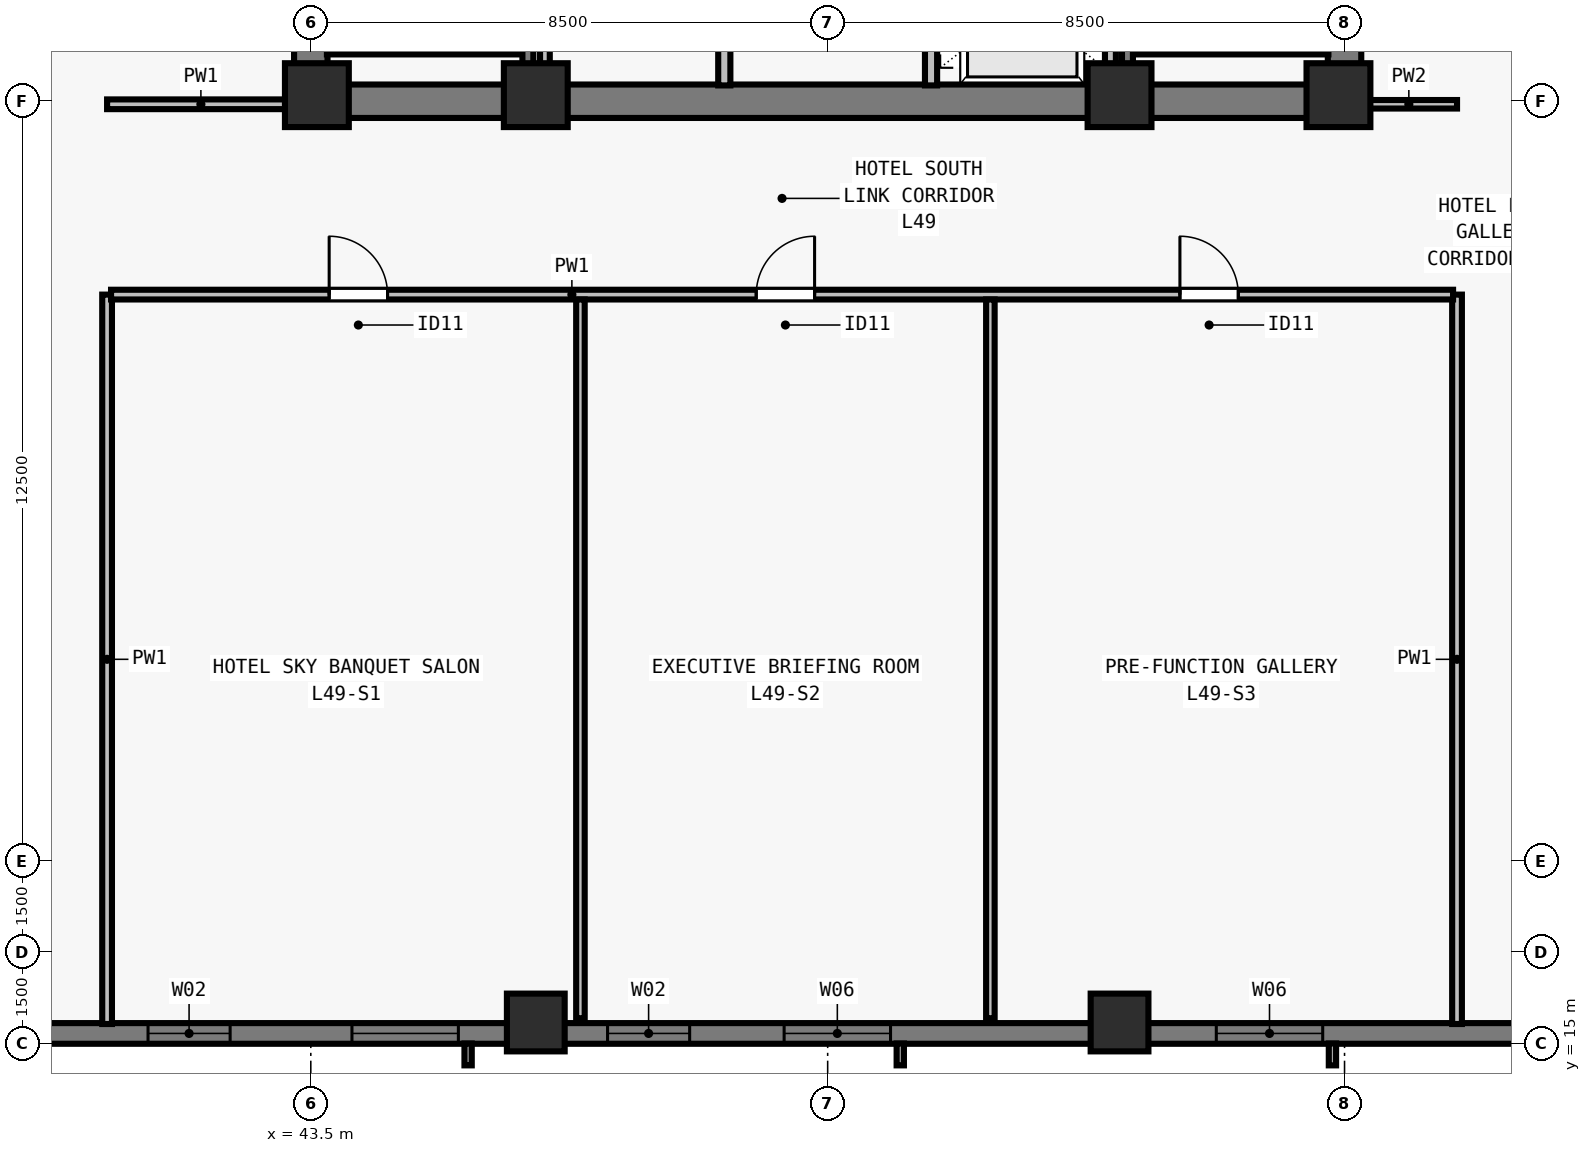
"""IFC4 building model, lengths in metres.
Left out: names, types, materials, properties, quantities, classifications, styles, units other than length and angle.
Written with IfcOpenShell. Run it as: python <this file> out.ifc"""

import sys

from ifc_helpers import new_model, si_unit, direction, frame, frame_2d, origin, origin_2d, place, context, subcontext, project, spatial, rectangle, extrude, element, fill, save


model = new_model("IFC4")
c1 = context("Model", 3, precision=1e-05, world=origin(), true_north=direction((0.0, 1.0)))
c2 = subcontext(c1, "Body", "Model", "MODEL_VIEW")
j1 = project(units=[si_unit("LENGTHUNIT", "METRE"), si_unit("PLANEANGLEUNIT", "RADIAN")], contexts=[c1])
p1 = place(None, origin())
s1 = spatial("IfcSite", under=j1, at=p1, CompositionType="ELEMENT")
p2 = place(p1, origin())
s2 = spatial("IfcBuilding", under=s1, at=p2, CompositionType="ELEMENT")
p3 = place(p2, frame((0.0, 0.0, 179.5)))
s3 = spatial("IfcBuildingStorey", under=s2, at=p3, CompositionType="ELEMENT", Elevation=179.5)
for number, where, z_axis, x_axis in (
    (1, (43.6, 30.6, 0.0), (0.0, 0.0, 1.0), (1.0, 0.0, 0.0)),
    (2, (47.2, 30.6, 0.0), (0.0, 0.0, 1.0), (1.0, 0.0, 0.0)),
    (3, (56.8, 30.6, 0.0), (0.0, 0.0, 1.0), (1.0, 0.0, 0.0)),
    (4, (60.4, 30.6, 0.0), (0.0, 0.0, 1.0), (1.0, 0.0, 0.0)),
):
    element("IfcColumn", number, at=place(p3, frame(where, z_axis=z_axis, x_axis=x_axis)), inside=s3, PredefinedType="COLUMN", context=c2, shape_type="SweptSolid", body=[
        extrude(rectangle(XDim=1.05, YDim=1.05, at=origin_2d()), origin(), (0.0, 0.0, 1.0), 3.5),
    ])
for number, where, z_axis, x_axis in (
    (5, (47.2, 15.35, 0.0), (0.0, 0.0, 1.0), (1.0, 0.0, 0.0)),
    (6, (56.8, 15.35, 0.0), (0.0, 0.0, 1.0), (1.0, 0.0, 0.0)),
):
    element("IfcColumn", number, at=place(p3, frame(where, z_axis=z_axis, x_axis=x_axis)), inside=s3, PredefinedType="COLUMN", context=c2, shape_type="SweptSolid", body=[
        extrude(rectangle(XDim=0.95, YDim=0.95, at=origin_2d()), origin(), (0.0, 0.0, 1.0), 3.5),
    ])
p4 = place(p3, frame((72.0, 15.17, 0.0), z_axis=(0.0, 0.0, 1.0), x_axis=(-1.0, 0.0, 0.0)))
e7 = element("IfcWall", 7, at=p4, inside=s3, PredefinedType="SOLIDWALL", context=c2, shape_type="SweptSolid", body=[
    extrude(rectangle(XDim=39.682, YDim=0.34, at=frame_2d((19.841, 0.0))), origin(), (0.0, 0.0, 1.0), 3.28),
])
p5 = place(p4, frame((11.859, 0.0, 0.8)))
e8 = element("IfcOpeningElement", 8, at=p5, cuts=e7, PredefinedType="OPENING", context=c2, shape_type="SweptSolid", body=[
    extrude(rectangle(XDim=1.75, YDim=1.66, at=frame_2d((0.875, 0.83))), frame((0.0, 0.18, 0.0), z_axis=(0.0, -1.0, 0.0), x_axis=(1.0, 0.0, 0.0)), (0.0, 0.0, 1.0), 0.36),
])
p6 = place(p4, frame((18.966, 0.0, 0.8)))
e9 = element("IfcOpeningElement", 9, at=p6, cuts=e7, PredefinedType="OPENING", context=c2, shape_type="SweptSolid", body=[
    extrude(rectangle(XDim=1.75, YDim=1.66, at=frame_2d((0.875, 0.83))), frame((0.0, 0.18, 0.0), z_axis=(0.0, -1.0, 0.0), x_axis=(1.0, 0.0, 0.0)), (0.0, 0.0, 1.0), 0.36),
])
p7 = place(p4, frame((22.27, 0.0, 0.8)))
e10 = element("IfcOpeningElement", 10, at=p7, cuts=e7, PredefinedType="OPENING", context=c2, shape_type="SweptSolid", body=[
    extrude(rectangle(XDim=1.35, YDim=1.66, at=frame_2d((0.675, 0.83))), frame((0.0, 0.18, 0.0), z_axis=(0.0, -1.0, 0.0), x_axis=(1.0, 0.0, 0.0)), (0.0, 0.0, 1.0), 0.36),
])
p8 = place(p4, frame((26.073, 0.0, 0.8)))
e11 = element("IfcOpeningElement", 11, at=p8, cuts=e7, PredefinedType="OPENING", context=c2, shape_type="SweptSolid", body=[
    extrude(rectangle(XDim=1.75, YDim=1.66, at=frame_2d((0.875, 0.83))), frame((0.0, 0.18, 0.0), z_axis=(0.0, -1.0, 0.0), x_axis=(1.0, 0.0, 0.0)), (0.0, 0.0, 1.0), 0.36),
])
p9 = place(p4, frame((29.827, 0.0, 0.8)))
e12 = element("IfcOpeningElement", 12, at=p9, cuts=e7, PredefinedType="OPENING", context=c2, shape_type="SweptSolid", body=[
    extrude(rectangle(XDim=1.35, YDim=1.66, at=frame_2d((0.675, 0.83))), frame((0.0, 0.18, 0.0), z_axis=(0.0, -1.0, 0.0), x_axis=(1.0, 0.0, 0.0)), (0.0, 0.0, 1.0), 0.36),
])
p10 = place(p3, frame((43.225, 30.5, 0.0), z_axis=(0.0, 0.0, 1.0), x_axis=(1.0, 0.0, 0.0)))
e13 = element("IfcWall", 13, at=p10, inside=s3, PredefinedType="SHEAR", context=c2, shape_type="SweptSolid", body=[
    extrude(rectangle(XDim=17.55, YDim=0.55, at=frame_2d((8.775, 0.0))), origin(), (0.0, 0.0, 1.0), 3.28),
])
for number, where, z_axis, x_axis in (
    (14, (43.5, 30.765, 0.0), (0.0, 0.0, 1.0), (0.0, 1.0, 0.0)),
    (15, (60.5, 30.765, 0.0), (0.0, 0.0, 1.0), (0.0, 1.0, 0.0)),
):
    element("IfcWall", number, at=place(p3, frame(where, z_axis=z_axis, x_axis=x_axis)), inside=s3, PredefinedType="SHEAR", context=c2, shape_type="SweptSolid", body=[
        extrude(rectangle(XDim=7.985, YDim=0.55, at=frame_2d((3.993, 0.0))), origin(), (0.0, 0.0, 1.0), 3.28),
    ])
p11 = place(p3, frame((50.3, 30.76, 0.0), z_axis=(0.0, 0.0, 1.0), x_axis=(0.0, 1.0, 0.0)))
e16 = element("IfcWall", 16, at=p11, inside=s3, PredefinedType="SOLIDWALL", context=c2, shape_type="SweptSolid", body=[
    extrude(rectangle(XDim=7.855, YDim=0.2, at=frame_2d((3.927, 0.0))), origin(), (0.0, 0.0, 1.0), 3.28),
])
p12 = place(p11, frame((3.29, 0.0, 0.0)))
e17 = element("IfcOpeningElement", 17, at=p12, cuts=e16, PredefinedType="OPENING", context=c2, shape_type="SweptSolid", body=[
    extrude(rectangle(XDim=0.9, YDim=2.12, at=frame_2d((0.45, 1.06))), frame((0.0, 0.11, 0.0), z_axis=(0.0, -1.0, 0.0), x_axis=(1.0, 0.0, 0.0)), (0.0, 0.0, 1.0), 0.22),
])
p13 = place(p3, frame((53.7, 30.76, 0.0), z_axis=(0.0, 0.0, 1.0), x_axis=(0.0, 1.0, 0.0)))
e18 = element("IfcWall", 18, at=p13, inside=s3, PredefinedType="SOLIDWALL", context=c2, shape_type="SweptSolid", body=[
    extrude(rectangle(XDim=7.855, YDim=0.2, at=frame_2d((3.927, 0.0))), origin(), (0.0, 0.0, 1.0), 3.28),
])
p14 = place(p13, frame((0.79, 0.0, 0.0)))
e19 = element("IfcOpeningElement", 19, at=p14, cuts=e18, PredefinedType="OPENING", context=c2, shape_type="SweptSolid", body=[
    extrude(rectangle(XDim=1.1, YDim=2.2, at=frame_2d((0.55, 1.1))), frame((0.0, 0.11, 0.0), z_axis=(0.0, -1.0, 0.0), x_axis=(1.0, 0.0, 0.0)), (0.0, 0.0, 1.0), 0.22),
])
p15 = place(p13, frame((3.49, 0.0, 0.0)))
e20 = element("IfcOpeningElement", 20, at=p15, cuts=e18, PredefinedType="OPENING", context=c2, shape_type="SweptSolid", body=[
    extrude(rectangle(XDim=1.1, YDim=2.2, at=frame_2d((0.55, 1.1))), frame((0.0, 0.11, 0.0), z_axis=(0.0, -1.0, 0.0), x_axis=(1.0, 0.0, 0.0)), (0.0, 0.0, 1.0), 0.22),
])
p16 = place(p13, frame((6.19, 0.0, 0.0)))
e21 = element("IfcOpeningElement", 21, at=p16, cuts=e18, PredefinedType="OPENING", context=c2, shape_type="SweptSolid", body=[
    extrude(rectangle(XDim=1.1, YDim=2.2, at=frame_2d((0.55, 1.1))), frame((0.0, 0.11, 0.0), z_axis=(0.0, -1.0, 0.0), x_axis=(1.0, 0.0, 0.0)), (0.0, 0.0, 1.0), 0.22),
])
p17 = place(p3, frame((47.35, 30.76, 0.0), z_axis=(0.0, 0.0, 1.0), x_axis=(0.0, 1.0, 0.0)))
e22 = element("IfcWall", 22, at=p17, inside=s3, PredefinedType="PARTITIONING", context=c2, shape_type="SweptSolid", body=[
    extrude(rectangle(XDim=7.855, YDim=0.16, at=frame_2d((3.927, 0.0))), origin(), (0.0, 0.0, 1.0), 3.28),
])
p18 = place(p3, frame((56.65, 30.76, 0.0), z_axis=(0.0, 0.0, 1.0), x_axis=(0.0, 1.0, 0.0)))
e23 = element("IfcWall", 23, at=p18, inside=s3, PredefinedType="SOLIDWALL", context=c2, shape_type="SweptSolid", body=[
    extrude(rectangle(XDim=7.855, YDim=0.18, at=frame_2d((3.927, 0.0))), origin(), (0.0, 0.0, 1.0), 3.28),
])
p19 = place(p3, frame((40.15, 15.325, 0.0), z_axis=(0.0, 0.0, 1.0), x_axis=(0.0, 1.0, 0.0)))
e24 = element("IfcWall", 24, at=p19, inside=s3, PredefinedType="PARTITIONING", context=c2, shape_type="SweptSolid", body=[
    extrude(rectangle(XDim=11.995, YDim=0.16, at=frame_2d((5.998, 0.0))), origin(), (0.0, 0.0, 1.0), 2.555),
])
p20 = place(p3, frame((40.15, 30.45, 0.0), z_axis=(0.0, 0.0, 1.0), x_axis=(1.0, 0.0, 0.0)))
e25 = element("IfcWall", 25, at=p20, inside=s3, PredefinedType="PARTITIONING", context=c2, shape_type="SweptSolid", body=[
    extrude(rectangle(XDim=3.085, YDim=0.16, at=frame_2d((1.542, 0.0))), origin(), (0.0, 0.0, 1.0), 3.28),
])
p21 = place(p3, frame((62.35, 15.325, 0.0), z_axis=(0.0, 0.0, 1.0), x_axis=(0.0, 1.0, 0.0)))
e26 = element("IfcWall", 26, at=p21, inside=s3, PredefinedType="PARTITIONING", context=c2, shape_type="SweptSolid", body=[
    extrude(rectangle(XDim=11.995, YDim=0.16, at=frame_2d((5.998, 0.0))), origin(), (0.0, 0.0, 1.0), 3.28),
])
p22 = place(p3, frame((60.765, 30.45, 0.0), z_axis=(0.0, 0.0, 1.0), x_axis=(1.0, 0.0, 0.0)))
e27 = element("IfcWall", 27, at=p22, inside=s3, PredefinedType="PARTITIONING", context=c2, shape_type="SweptSolid", body=[
    extrude(rectangle(XDim=1.585, YDim=0.14, at=frame_2d((0.792, 0.0))), origin(), (0.0, 0.0, 1.0), 3.28),
])
p23 = place(p3, frame((40.215, 27.32, 0.0), z_axis=(0.0, 0.0, 1.0), x_axis=(1.0, 0.0, 0.0)))
e28 = element("IfcWall", 28, at=p23, inside=s3, PredefinedType="PARTITIONING", context=c2, shape_type="SweptSolid", body=[
    extrude(rectangle(XDim=22.07, YDim=0.16, at=frame_2d((11.035, 0.0))), origin(), (0.0, 0.0, 1.0), 3.28),
])
p24 = place(p23, frame((3.587, 0.0, 0.0)))
e29 = element("IfcOpeningElement", 29, at=p24, cuts=e28, PredefinedType="OPENING", context=c2, shape_type="SweptSolid", body=[
    extrude(rectangle(XDim=0.96, YDim=2.12, at=frame_2d((0.48, 1.06))), frame((0.0, 0.09, 0.0), z_axis=(0.0, -1.0, 0.0), x_axis=(1.0, 0.0, 0.0)), (0.0, 0.0, 1.0), 0.18),
])
p25 = place(p23, frame((10.61, 0.0, 0.0)))
e30 = element("IfcOpeningElement", 30, at=p25, cuts=e28, PredefinedType="OPENING", context=c2, shape_type="SweptSolid", body=[
    extrude(rectangle(XDim=0.96, YDim=2.12, at=frame_2d((0.48, 1.06))), frame((0.0, 0.09, 0.0), z_axis=(0.0, -1.0, 0.0), x_axis=(1.0, 0.0, 0.0)), (0.0, 0.0, 1.0), 0.18),
])
p26 = place(p23, frame((17.578, 0.0, 0.0)))
e31 = element("IfcOpeningElement", 31, at=p26, cuts=e28, PredefinedType="OPENING", context=c2, shape_type="SweptSolid", body=[
    extrude(rectangle(XDim=0.96, YDim=2.12, at=frame_2d((0.48, 1.06))), frame((0.0, 0.09, 0.0), z_axis=(0.0, -1.0, 0.0), x_axis=(1.0, 0.0, 0.0)), (0.0, 0.0, 1.0), 0.18),
])
p27 = place(p3, frame((47.934, 15.42, 0.0), z_axis=(0.0, 0.0, 1.0), x_axis=(0.0, 1.0, 0.0)))
e32 = element("IfcWall", 32, at=p27, inside=s3, PredefinedType="PARTITIONING", context=c2, shape_type="SweptSolid", body=[
    extrude(rectangle(XDim=11.82, YDim=0.14, at=frame_2d((5.91, 0.0))), origin(), (0.0, 0.0, 1.0), 2.896),
])
p28 = place(p3, frame((54.676, 15.42, 0.0), z_axis=(0.0, 0.0, 1.0), x_axis=(0.0, 1.0, 0.0)))
e33 = element("IfcWall", 33, at=p28, inside=s3, PredefinedType="PARTITIONING", context=c2, shape_type="SweptSolid", body=[
    extrude(rectangle(XDim=11.82, YDim=0.14, at=frame_2d((5.91, 0.0))), origin(), (0.0, 0.0, 1.0), 3.28),
])
p29 = place(p3, frame((43.765, 31.36, 0.0), z_axis=(0.0, 0.0, 1.0), x_axis=(1.0, 0.0, 0.0)))
e34 = element("IfcWall", 34, at=p29, inside=s3, PredefinedType="SOLIDWALL", context=c2, shape_type="SweptSolid", body=[
    extrude(rectangle(XDim=3.23, YDim=0.18, at=frame_2d((1.615, 0.0))), origin(), (0.0, 0.0, 1.0), 3.28),
])
p30 = place(p3, frame((47.07, 38.78, 0.0), z_axis=(0.0, 0.0, 1.0), x_axis=(0.0, -1.0, 0.0)))
e35 = element("IfcWall", 35, at=p30, inside=s3, PredefinedType="SOLIDWALL", context=c2, shape_type="SweptSolid", body=[
    extrude(rectangle(XDim=8.017, YDim=0.18, at=frame_2d((4.009, 0.0))), origin(), (0.0, 0.0, 1.0), 3.28),
])
p31 = place(p3, frame((57.005, 31.36, 0.0), z_axis=(0.0, 0.0, 1.0), x_axis=(1.0, 0.0, 0.0)))
e36 = element("IfcWall", 36, at=p31, inside=s3, PredefinedType="SOLIDWALL", context=c2, shape_type="SweptSolid", body=[
    extrude(rectangle(XDim=3.23, YDim=0.18, at=frame_2d((1.615, 0.0))), origin(), (0.0, 0.0, 1.0), 3.28),
])
p32 = place(p3, frame((56.93, 38.78, 0.0), z_axis=(0.0, 0.0, 1.0), x_axis=(0.0, -1.0, 0.0)))
e37 = element("IfcWall", 37, at=p32, inside=s3, PredefinedType="SOLIDWALL", context=c2, shape_type="SweptSolid", body=[
    extrude(rectangle(XDim=8.017, YDim=0.18, at=frame_2d((4.009, 0.0))), origin(), (0.0, 0.0, 1.0), 3.28),
])
p33 = place(p5, origin())
e38 = element("IfcWindow", 38, at=p33, inside=s3, PartitioningType="SINGLE_PANEL", PredefinedType="WINDOW", context=c2, shape_type="SweptSolid", body=[
    extrude(rectangle(XDim=1.75, YDim=1.66, at=frame_2d((0.875, 0.83))), frame((0.0, -0.05, 0.0), z_axis=(0.0, -1.0, 0.0), x_axis=(1.0, 0.0, 0.0)), (0.0, 0.0, 1.0), 0.06),
])
fill(e8, e38)
p34 = place(p6, origin())
e39 = element("IfcWindow", 39, at=p34, inside=s3, PartitioningType="SINGLE_PANEL", PredefinedType="WINDOW", context=c2, shape_type="SweptSolid", body=[
    extrude(rectangle(XDim=1.75, YDim=1.66, at=frame_2d((0.875, 0.83))), frame((0.0, -0.05, 0.0), z_axis=(0.0, -1.0, 0.0), x_axis=(1.0, 0.0, 0.0)), (0.0, 0.0, 1.0), 0.06),
])
fill(e9, e39)
p35 = place(p7, origin())
e40 = element("IfcWindow", 40, at=p35, inside=s3, PartitioningType="SINGLE_PANEL", PredefinedType="WINDOW", context=c2, shape_type="SweptSolid", body=[
    extrude(rectangle(XDim=1.35, YDim=1.66, at=frame_2d((0.675, 0.83))), frame((0.0, -0.05, 0.0), z_axis=(0.0, -1.0, 0.0), x_axis=(1.0, 0.0, 0.0)), (0.0, 0.0, 1.0), 0.06),
])
fill(e10, e40)
p36 = place(p8, origin())
e41 = element("IfcWindow", 41, at=p36, inside=s3, PartitioningType="SINGLE_PANEL", PredefinedType="WINDOW", context=c2, shape_type="SweptSolid", body=[
    extrude(rectangle(XDim=1.75, YDim=1.66, at=frame_2d((0.875, 0.83))), frame((0.0, -0.05, 0.0), z_axis=(0.0, -1.0, 0.0), x_axis=(1.0, 0.0, 0.0)), (0.0, 0.0, 1.0), 0.06),
])
fill(e11, e41)
p37 = place(p9, origin())
e42 = element("IfcWindow", 42, at=p37, inside=s3, PartitioningType="SINGLE_PANEL", PredefinedType="WINDOW", context=c2, shape_type="SweptSolid", body=[
    extrude(rectangle(XDim=1.35, YDim=1.66, at=frame_2d((0.675, 0.83))), frame((0.0, -0.05, 0.0), z_axis=(0.0, -1.0, 0.0), x_axis=(1.0, 0.0, 0.0)), (0.0, 0.0, 1.0), 0.06),
])
fill(e12, e42)
p38 = place(p24, origin())
e43 = element("IfcDoor", 43, at=p38, inside=s3, OperationType="SINGLE_SWING_LEFT", PredefinedType="DOOR", context=c2, shape_type="SweptSolid", body=[
    extrude(rectangle(XDim=0.96, YDim=2.12, at=frame_2d((0.48, 1.06))), frame((0.0, 0.025, 0.0), z_axis=(0.0, -1.0, 0.0), x_axis=(1.0, 0.0, 0.0)), (0.0, 0.0, 1.0), 0.05),
])
fill(e29, e43)
p39 = place(p25, origin())
e44 = element("IfcDoor", 44, at=p39, inside=s3, OperationType="SINGLE_SWING_RIGHT", PredefinedType="DOOR", context=c2, shape_type="SweptSolid", body=[
    extrude(rectangle(XDim=0.96, YDim=2.12, at=frame_2d((0.48, 1.06))), frame((0.0, 0.025, 0.0), z_axis=(0.0, -1.0, 0.0), x_axis=(1.0, 0.0, 0.0)), (0.0, 0.0, 1.0), 0.05),
])
fill(e30, e44)
p40 = place(p26, origin())
e45 = element("IfcDoor", 45, at=p40, inside=s3, OperationType="SINGLE_SWING_LEFT", PredefinedType="DOOR", context=c2, shape_type="SweptSolid", body=[
    extrude(rectangle(XDim=0.96, YDim=2.12, at=frame_2d((0.48, 1.06))), frame((0.0, 0.025, 0.0), z_axis=(0.0, -1.0, 0.0), x_axis=(1.0, 0.0, 0.0)), (0.0, 0.0, 1.0), 0.05),
])
fill(e31, e45)
save(model, sys.argv[1])
